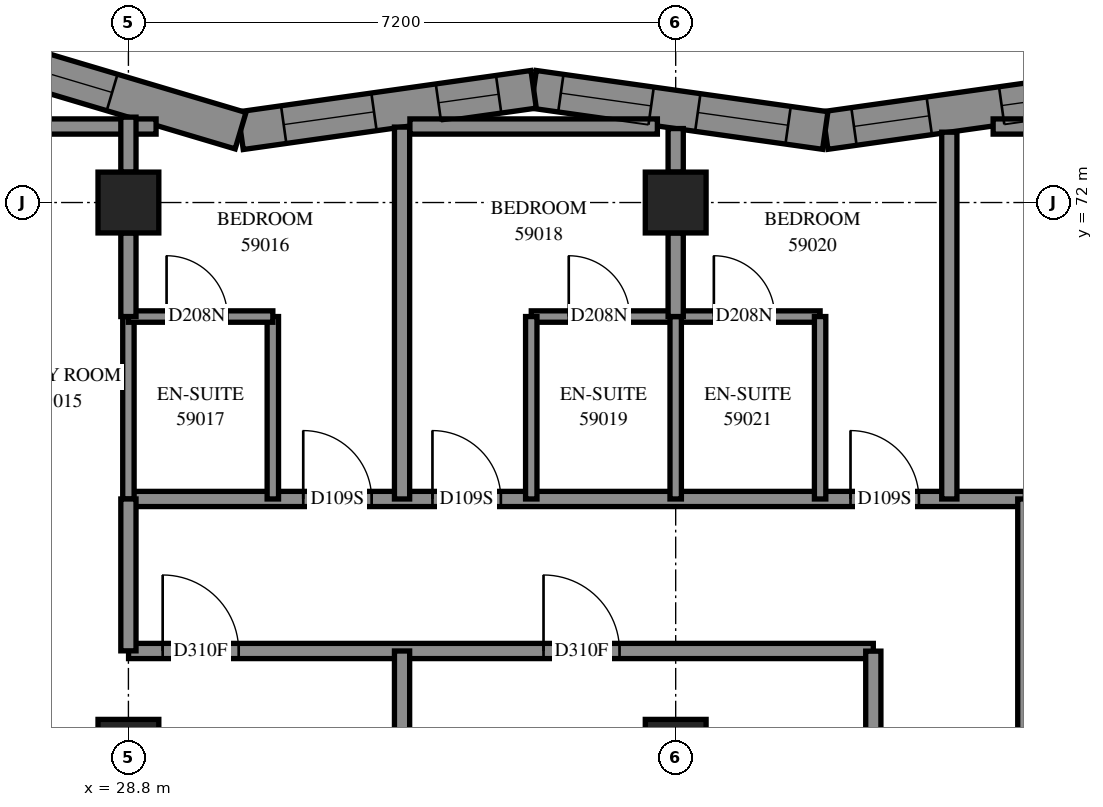
"""IFC4 building model, lengths in metres.
Left out: names, types, materials, properties, quantities, classifications, styles, units other than length and angle.
Written with IfcOpenShell. Run it as: python <this file> out.ifc"""

import sys

from ifc_helpers import new_model, si_unit, direction, frame, frame_2d, origin, origin_2d, place, context, subcontext, project, spatial, polyline, rectangle, outline, extrude, element, fill, save


model = new_model("IFC4")
c1 = context("Model", 3, precision=1e-05, world=origin(), true_north=direction((0.0, 1.0)))
c2 = subcontext(c1, "Body", "Model", "MODEL_VIEW")
j1 = project(units=[si_unit("LENGTHUNIT", "METRE"), si_unit("PLANEANGLEUNIT", "RADIAN")], contexts=[c1])
p1 = place(None, origin())
s1 = spatial("IfcSite", under=j1, at=p1, CompositionType="ELEMENT")
p2 = place(p1, origin())
s2 = spatial("IfcBuilding", under=s1, at=p2, CompositionType="ELEMENT")
p3 = place(p2, frame((0.0, 0.0, 216.8)))
s3 = spatial("IfcBuildingStorey", under=s2, at=p3, CompositionType="ELEMENT", Elevation=216.8)
for number, where, z_axis, x_axis in (
    (1, (28.8, 64.8, 0.0), (0.0, 0.0, 1.0), (1.0, 0.0, 0.0)),
    (2, (28.8, 72.0, 0.0), (0.0, 0.0, 1.0), (1.0, 0.0, 0.0)),
    (3, (36.0, 64.8, 0.0), (0.0, 0.0, 1.0), (1.0, 0.0, 0.0)),
    (4, (36.0, 72.0, 0.0), (0.0, 0.0, 1.0), (1.0, 0.0, 0.0)),
):
    element("IfcColumn", number, at=place(p3, frame(where, z_axis=z_axis, x_axis=x_axis)), inside=s3, PredefinedType="COLUMN", context=c2, shape_type="SweptSolid", body=[
        extrude(rectangle(XDim=0.8, YDim=0.8, at=origin_2d()), origin(), (0.0, 0.0, 1.0), 3.1),
    ])
p4 = place(p3, frame((41.804, 73.49, 0.0), z_axis=(0.0, 0.0, 1.0), x_axis=(-0.9901681853, -0.1398819675, 0.0)))
e5 = element("IfcWall", 5, at=p4, inside=s3, PredefinedType="SOLIDWALL", context=c2, shape_type="SweptSolid", body=[
    extrude(outline(polyline([(-0.035, -0.25), (3.839, -0.25), (3.91, 0.25), (0.035, 0.25), (-0.035, -0.25)])), origin(), (0.0, 0.0, 1.0), 3.1),
])
p5 = place(p4, frame((0.331, 0.0, 0.45)))
e6 = element("IfcOpeningElement", 6, at=p5, cuts=e5, PredefinedType="OPENING", context=c2, shape_type="SweptSolid", body=[
    extrude(rectangle(XDim=1.2, YDim=2.5, at=frame_2d((0.6, 1.25))), frame((0.0, 0.26, 0.0), z_axis=(0.0, -1.0, 0.0), x_axis=(1.0, 0.0, 0.0)), (0.0, 0.0, 1.0), 0.52),
])
p6 = place(p4, frame((2.493, 0.0, 0.45)))
e7 = element("IfcOpeningElement", 7, at=p6, cuts=e5, PredefinedType="OPENING", context=c2, shape_type="SweptSolid", body=[
    extrude(rectangle(XDim=1.0, YDim=2.5, at=frame_2d((0.5, 1.25))), frame((0.0, 0.26, 0.0), z_axis=(0.0, -1.0, 0.0), x_axis=(1.0, 0.0, 0.0)), (0.0, 0.0, 1.0), 0.52),
])
p7 = place(p3, frame((37.968, 72.948, 0.0), z_axis=(0.0, 0.0, 1.0), x_axis=(-0.9901676803, 0.1398855422, 0.0)))
e8 = element("IfcWall", 8, at=p7, inside=s3, PredefinedType="SOLIDWALL", context=c2, shape_type="SweptSolid", body=[
    extrude(outline(polyline([(0.035, -0.25), (3.91, -0.25), (3.839, 0.25), (-0.035, 0.25), (0.035, -0.25)])), origin(), (0.0, 0.0, 1.0), 3.1),
])
p8 = place(p7, frame((0.494, 0.0, 0.45)))
e9 = element("IfcOpeningElement", 9, at=p8, cuts=e8, PredefinedType="OPENING", context=c2, shape_type="SweptSolid", body=[
    extrude(rectangle(XDim=1.2, YDim=2.5, at=frame_2d((0.6, 1.25))), frame((0.0, 0.26, 0.0), z_axis=(0.0, -1.0, 0.0), x_axis=(1.0, 0.0, 0.0)), (0.0, 0.0, 1.0), 0.52),
])
p9 = place(p7, frame((2.313, 0.0, 0.45)))
e10 = element("IfcOpeningElement", 10, at=p9, cuts=e8, PredefinedType="OPENING", context=c2, shape_type="SweptSolid", body=[
    extrude(rectangle(XDim=1.2, YDim=2.5, at=frame_2d((0.6, 1.25))), frame((0.0, 0.26, 0.0), z_axis=(0.0, -1.0, 0.0), x_axis=(1.0, 0.0, 0.0)), (0.0, 0.0, 1.0), 0.52),
])
p10 = place(p3, frame((34.131, 73.49, 0.0), z_axis=(0.0, 0.0, 1.0), x_axis=(-0.9901681239, -0.1398824019, 0.0)))
e11 = element("IfcWall", 11, at=p10, inside=s3, PredefinedType="SOLIDWALL", context=c2, shape_type="SweptSolid", body=[
    extrude(outline(polyline([(-0.035, -0.25), (3.839, -0.25), (3.949, 0.25), (0.035, 0.25), (-0.035, -0.25)])), origin(), (0.0, 0.0, 1.0), 3.1),
])
p11 = place(p10, frame((2.121, 0.0, 0.45)))
e12 = element("IfcOpeningElement", 12, at=p11, cuts=e11, PredefinedType="OPENING", context=c2, shape_type="SweptSolid", body=[
    extrude(rectangle(XDim=1.2, YDim=2.5, at=frame_2d((0.6, 1.25))), frame((0.0, 0.26, 0.0), z_axis=(0.0, -1.0, 0.0), x_axis=(1.0, 0.0, 0.0)), (0.0, 0.0, 1.0), 0.52),
])
p12 = place(p10, frame((0.465, 0.0, 0.45)))
e13 = element("IfcOpeningElement", 13, at=p12, cuts=e11, PredefinedType="OPENING", context=c2, shape_type="SweptSolid", body=[
    extrude(rectangle(XDim=0.8, YDim=2.5, at=frame_2d((0.4, 1.25))), frame((0.0, 0.26, 0.0), z_axis=(0.0, -1.0, 0.0), x_axis=(1.0, 0.0, 0.0)), (0.0, 0.0, 1.0), 0.52),
])
p13 = place(p3, frame((30.276, 72.945, 0.0), z_axis=(0.0, 0.0, 1.0), x_axis=(-0.9584414972, 0.2852891453, 0.0)))
e14 = element("IfcWall", 14, at=p13, inside=s3, PredefinedType="SOLIDWALL", context=c2, shape_type="SweptSolid", body=[
    extrude(outline(polyline([(0.054, -0.25), (4.058, -0.25), (3.387, 0.25), (-0.054, 0.25), (0.054, -0.25)])), origin(), (0.0, 0.0, 1.0), 3.1),
])
p14 = place(p13, frame((1.763, 0.0, 0.45)))
e15 = element("IfcOpeningElement", 15, at=p14, cuts=e14, PredefinedType="OPENING", context=c2, shape_type="SweptSolid", body=[
    extrude(rectangle(XDim=1.2, YDim=2.5, at=frame_2d((0.6, 1.25))), frame((0.0, 0.26, 0.0), z_axis=(0.0, -1.0, 0.0), x_axis=(1.0, 0.0, 0.0)), (0.0, 0.0, 1.0), 0.52),
])
p15 = place(p3, frame((28.8, 68.1, 0.0), z_axis=(0.0, 0.0, 1.0), x_axis=(1.0, 0.0, 0.0)))
e16 = element("IfcWall", 16, at=p15, inside=s3, PredefinedType="PARTITIONING", context=c2, shape_type="SweptSolid", body=[
    extrude(rectangle(XDim=11.8, YDim=0.2, at=frame_2d((5.9, 0.0))), origin(), (0.0, 0.0, 1.0), 3.1),
])
p16 = place(p15, frame((2.3, 0.0, 0.0)))
e17 = element("IfcOpeningElement", 17, at=p16, cuts=e16, PredefinedType="OPENING", context=c2, shape_type="SweptSolid", body=[
    extrude(rectangle(XDim=0.9, YDim=2.1, at=frame_2d((0.45, 1.05))), frame((0.0, 0.11, 0.0), z_axis=(0.0, -1.0, 0.0), x_axis=(1.0, 0.0, 0.0)), (0.0, 0.0, 1.0), 0.22),
])
p17 = place(p15, frame((4.0, 0.0, 0.0)))
e18 = element("IfcOpeningElement", 18, at=p17, cuts=e16, PredefinedType="OPENING", context=c2, shape_type="SweptSolid", body=[
    extrude(rectangle(XDim=0.9, YDim=2.1, at=frame_2d((0.45, 1.05))), frame((0.0, 0.11, 0.0), z_axis=(0.0, -1.0, 0.0), x_axis=(1.0, 0.0, 0.0)), (0.0, 0.0, 1.0), 0.22),
])
p18 = place(p15, frame((9.5, 0.0, 0.0)))
e19 = element("IfcOpeningElement", 19, at=p18, cuts=e16, PredefinedType="OPENING", context=c2, shape_type="SweptSolid", body=[
    extrude(rectangle(XDim=0.9, YDim=2.1, at=frame_2d((0.45, 1.05))), frame((0.0, 0.11, 0.0), z_axis=(0.0, -1.0, 0.0), x_axis=(1.0, 0.0, 0.0)), (0.0, 0.0, 1.0), 0.22),
])
p19 = place(p3, frame((28.802, 66.1, 0.0), z_axis=(0.0, 0.0, 1.0), x_axis=(1.0, 0.0, 0.0)))
e20 = element("IfcWall", 20, at=p19, inside=s3, PredefinedType="PARTITIONING", context=c2, shape_type="SweptSolid", body=[
    extrude(rectangle(XDim=9.798, YDim=0.2, at=frame_2d((4.899, 0.0))), origin(), (0.0, 0.0, 1.0), 3.1),
])
p20 = place(p19, frame((0.449, 0.0, 0.0)))
e21 = element("IfcOpeningElement", 21, at=p20, cuts=e20, PredefinedType="OPENING", context=c2, shape_type="SweptSolid", body=[
    extrude(rectangle(XDim=1.0, YDim=2.1, at=frame_2d((0.5, 1.05))), frame((0.0, 0.11, 0.0), z_axis=(0.0, -1.0, 0.0), x_axis=(1.0, 0.0, 0.0)), (0.0, 0.0, 1.0), 0.22),
])
p21 = place(p19, frame((5.459, 0.0, 0.0)))
e22 = element("IfcOpeningElement", 22, at=p21, cuts=e20, PredefinedType="OPENING", context=c2, shape_type="SweptSolid", body=[
    extrude(rectangle(XDim=1.0, YDim=2.1, at=frame_2d((0.5, 1.05))), frame((0.0, 0.11, 0.0), z_axis=(0.0, -1.0, 0.0), x_axis=(1.0, 0.0, 0.0)), (0.0, 0.0, 1.0), 0.22),
])
p22 = place(p3, frame((32.4, 68.1, 0.0), z_axis=(0.0, 0.0, 1.0), x_axis=(0.0, 1.0, 0.0)))
e23 = element("IfcWall", 23, at=p22, inside=s3, PredefinedType="PARTITIONING", context=c2, shape_type="SweptSolid", body=[
    extrude(rectangle(XDim=4.893, YDim=0.2, at=frame_2d((2.446, 0.0))), origin(), (0.0, 0.0, 1.0), 3.1),
])
p23 = place(p3, frame((39.6, 68.1, 0.0), z_axis=(0.0, 0.0, 1.0), x_axis=(0.0, 1.0, 0.0)))
e24 = element("IfcWall", 24, at=p23, inside=s3, PredefinedType="PARTITIONING", context=c2, shape_type="SweptSolid", body=[
    extrude(rectangle(XDim=4.826, YDim=0.2, at=frame_2d((2.413, 0.0))), origin(), (0.0, 0.0, 1.0), 3.1),
])
p24 = place(p3, frame((40.6, 63.402, 0.0), z_axis=(0.0, 0.0, 1.0), x_axis=(0.0, 1.0, 0.0)))
e25 = element("IfcWall", 25, at=p24, inside=s3, PredefinedType="PARTITIONING", context=c2, shape_type="SweptSolid", body=[
    extrude(rectangle(XDim=4.698, YDim=0.2, at=frame_2d((2.349, 0.0))), origin(), (0.0, 0.0, 1.0), 3.1),
])
p25 = place(p3, frame((34.1, 70.5, 0.0), z_axis=(0.0, 0.0, 1.0), x_axis=(1.0, 0.0, 0.0)))
e26 = element("IfcWall", 26, at=p25, inside=s3, PredefinedType="PARTITIONING", context=c2, shape_type="SweptSolid", body=[
    extrude(rectangle(XDim=3.8, YDim=0.15, at=frame_2d((1.9, 0.0))), origin(), (0.0, 0.0, 1.0), 3.1),
])
p26 = place(p25, frame((0.493, 0.0, 0.0)))
e27 = element("IfcOpeningElement", 27, at=p26, cuts=e26, PredefinedType="OPENING", context=c2, shape_type="SweptSolid", body=[
    extrude(rectangle(XDim=0.8, YDim=2.1, at=frame_2d((0.4, 1.05))), frame((0.0, 0.085, 0.0), z_axis=(0.0, -1.0, 0.0), x_axis=(1.0, 0.0, 0.0)), (0.0, 0.0, 1.0), 0.17),
])
p27 = place(p25, frame((2.402, 0.0, 0.0)))
e28 = element("IfcOpeningElement", 28, at=p27, cuts=e26, PredefinedType="OPENING", context=c2, shape_type="SweptSolid", body=[
    extrude(rectangle(XDim=0.8, YDim=2.1, at=frame_2d((0.4, 1.05))), frame((0.0, 0.085, 0.0), z_axis=(0.0, -1.0, 0.0), x_axis=(1.0, 0.0, 0.0)), (0.0, 0.0, 1.0), 0.17),
])
for number, where, z_axis, x_axis in (
    (29, (32.503, 73.0, 0.0), (0.0, 0.0, 1.0), (1.0, 0.0, 0.0)),
    (30, (40.176, 73.0, 0.0), (0.0, 0.0, 1.0), (1.0, 0.0, 0.0)),
):
    element("IfcWall", number, at=place(p3, frame(where, z_axis=z_axis, x_axis=x_axis)), inside=s3, PredefinedType="PARTITIONING", context=c2, shape_type="SweptSolid", body=[
        extrude(rectangle(XDim=3.256, YDim=0.2, at=frame_2d((1.628, 0.0))), origin(), (0.0, 0.0, 1.0), 3.1),
    ])
p28 = place(p3, frame((38.6, 63.402, 0.0), z_axis=(0.0, 0.0, 1.0), x_axis=(0.0, 1.0, 0.0)))
e31 = element("IfcWall", 31, at=p28, inside=s3, PredefinedType="PARTITIONING", context=c2, shape_type="SweptSolid", body=[
    extrude(rectangle(XDim=2.696, YDim=0.2, at=frame_2d((1.348, 0.0))), origin(), (0.0, 0.0, 1.0), 3.1),
])
p29 = place(p3, frame((28.8, 68.1, 0.0), z_axis=(0.0, 0.0, 1.0), x_axis=(0.0, 1.0, 0.0)))
e32 = element("IfcWall", 32, at=p29, inside=s3, PredefinedType="PARTITIONING", context=c2, shape_type="SweptSolid", body=[
    extrude(rectangle(XDim=2.4, YDim=0.15, at=frame_2d((1.2, 0.0))), origin(), (0.0, 0.0, 1.0), 2.6),
])
for number, where, z_axis, x_axis in (
    (33, (30.7, 68.1, 0.0), (0.0, 0.0, 1.0), (0.0, 1.0, 0.0)),
    (34, (34.1, 68.1, 0.0), (0.0, 0.0, 1.0), (0.0, 1.0, 0.0)),
    (35, (37.9, 68.1, 0.0), (0.0, 0.0, 1.0), (0.0, 1.0, 0.0)),
    (36, (36.0, 68.1, 0.0), (0.0, 0.0, 1.0), (0.0, 1.0, 0.0)),
):
    element("IfcWall", number, at=place(p3, frame(where, z_axis=z_axis, x_axis=x_axis)), inside=s3, PredefinedType="PARTITIONING", context=c2, shape_type="SweptSolid", body=[
        extrude(rectangle(XDim=2.4, YDim=0.15, at=frame_2d((1.2, 0.0))), origin(), (0.0, 0.0, 1.0), 3.1),
    ])
p30 = place(p3, frame((26.958, 73.0, 0.0), z_axis=(0.0, 0.0, 1.0), x_axis=(1.0, 0.0, 0.0)))
e37 = element("IfcWall", 37, at=p30, inside=s3, PredefinedType="PARTITIONING", context=c2, shape_type="SweptSolid", body=[
    extrude(rectangle(XDim=2.206, YDim=0.2, at=frame_2d((1.103, 0.0))), origin(), (0.0, 0.0, 1.0), 3.1),
])
p31 = place(p3, frame((28.8, 66.102, 0.0), z_axis=(0.0, 0.0, 1.0), x_axis=(0.0, 1.0, 0.0)))
e38 = element("IfcWall", 38, at=p31, inside=s3, PredefinedType="PARTITIONING", context=c2, shape_type="SweptSolid", body=[
    extrude(rectangle(XDim=1.998, YDim=0.2, at=frame_2d((0.999, 0.0))), origin(), (0.0, 0.0, 1.0), 2.6),
])
p32 = place(p3, frame((32.4, 64.1, 0.0), z_axis=(0.0, 0.0, 1.0), x_axis=(0.0, 1.0, 0.0)))
e39 = element("IfcWall", 39, at=p32, inside=s3, PredefinedType="PARTITIONING", context=c2, shape_type="SweptSolid", body=[
    extrude(rectangle(XDim=2.0, YDim=0.2, at=frame_2d((1.0, 0.0))), origin(), (0.0, 0.0, 1.0), 3.1),
])
p33 = place(p3, frame((28.8, 70.5, 0.0), z_axis=(0.0, 0.0, 1.0), x_axis=(1.0, 0.0, 0.0)))
e40 = element("IfcWall", 40, at=p33, inside=s3, PredefinedType="PARTITIONING", context=c2, shape_type="SweptSolid", body=[
    extrude(rectangle(XDim=1.9, YDim=0.15, at=frame_2d((0.95, 0.0))), origin(), (0.0, 0.0, 1.0), 3.1),
])
p34 = place(p33, frame((0.502, 0.0, 0.0)))
e41 = element("IfcOpeningElement", 41, at=p34, cuts=e40, PredefinedType="OPENING", context=c2, shape_type="SweptSolid", body=[
    extrude(rectangle(XDim=0.8, YDim=2.1, at=frame_2d((0.4, 1.05))), frame((0.0, 0.085, 0.0), z_axis=(0.0, -1.0, 0.0), x_axis=(1.0, 0.0, 0.0)), (0.0, 0.0, 1.0), 0.17),
])
p35 = place(p3, frame((28.8, 70.5, 0.0), z_axis=(0.0, 0.0, 1.0), x_axis=(0.0, 1.0, 0.0)))
e42 = element("IfcWall", 42, at=p35, inside=s3, PredefinedType="PARTITIONING", context=c2, shape_type="SweptSolid", body=[
    extrude(rectangle(XDim=1.1, YDim=0.2, at=frame_2d((0.55, 0.0))), origin(), (0.0, 0.0, 1.0), 2.6),
])
p36 = place(p3, frame((36.0, 70.5, 0.0), z_axis=(0.0, 0.0, 1.0), x_axis=(0.0, 1.0, 0.0)))
e43 = element("IfcWall", 43, at=p36, inside=s3, PredefinedType="PARTITIONING", context=c2, shape_type="SweptSolid", body=[
    extrude(rectangle(XDim=1.1, YDim=0.2, at=frame_2d((0.55, 0.0))), origin(), (0.0, 0.0, 1.0), 3.1),
])
p37 = place(p3, frame((28.8, 72.4, 0.0), z_axis=(0.0, 0.0, 1.0), x_axis=(0.0, 1.0, 0.0)))
e44 = element("IfcWall", 44, at=p37, inside=s3, PredefinedType="PARTITIONING", context=c2, shape_type="SweptSolid", body=[
    extrude(rectangle(XDim=0.723, YDim=0.2, at=frame_2d((0.362, 0.0))), origin(), (0.0, 0.0, 1.0), 3.1),
])
p38 = place(p3, frame((36.0, 72.4, 0.0), z_axis=(0.0, 0.0, 1.0), x_axis=(0.0, 1.0, 0.0)))
e45 = element("IfcWall", 45, at=p38, inside=s3, PredefinedType="PARTITIONING", context=c2, shape_type="SweptSolid", body=[
    extrude(rectangle(XDim=0.573, YDim=0.2, at=frame_2d((0.286, 0.0))), origin(), (0.0, 0.0, 1.0), 3.1),
])
p39 = place(p5, origin())
e46 = element("IfcWindow", 46, at=p39, inside=s3, PartitioningType="SINGLE_PANEL", PredefinedType="WINDOW", context=c2, shape_type="SweptSolid", body=[
    extrude(rectangle(XDim=1.2, YDim=2.5, at=frame_2d((0.6, 1.25))), frame((0.0, 0.14, 0.0), z_axis=(0.0, -1.0, 0.0), x_axis=(1.0, 0.0, 0.0)), (0.0, 0.0, 1.0), 0.06),
])
fill(e6, e46)
p40 = place(p8, origin())
e47 = element("IfcWindow", 47, at=p40, inside=s3, PartitioningType="SINGLE_PANEL", PredefinedType="WINDOW", context=c2, shape_type="SweptSolid", body=[
    extrude(rectangle(XDim=1.2, YDim=2.5, at=frame_2d((0.6, 1.25))), frame((0.0, 0.18, 0.0), z_axis=(0.0, -1.0, 0.0), x_axis=(1.0, 0.0, 0.0)), (0.0, 0.0, 1.0), 0.06),
])
fill(e9, e47)
p41 = place(p9, origin())
e48 = element("IfcWindow", 48, at=p41, inside=s3, PartitioningType="SINGLE_PANEL", PredefinedType="WINDOW", context=c2, shape_type="SweptSolid", body=[
    extrude(rectangle(XDim=1.2, YDim=2.5, at=frame_2d((0.6, 1.25))), frame((0.0, 0.14, 0.0), z_axis=(0.0, -1.0, 0.0), x_axis=(1.0, 0.0, 0.0)), (0.0, 0.0, 1.0), 0.06),
])
fill(e10, e48)
p42 = place(p11, origin())
e49 = element("IfcWindow", 49, at=p42, inside=s3, PartitioningType="SINGLE_PANEL", PredefinedType="WINDOW", context=c2, shape_type="SweptSolid", body=[
    extrude(rectangle(XDim=1.2, YDim=2.5, at=frame_2d((0.6, 1.25))), frame((0.0, 0.18, 0.0), z_axis=(0.0, -1.0, 0.0), x_axis=(1.0, 0.0, 0.0)), (0.0, 0.0, 1.0), 0.06),
])
fill(e12, e49)
p43 = place(p14, origin())
e50 = element("IfcWindow", 50, at=p43, inside=s3, PartitioningType="SINGLE_PANEL", PredefinedType="WINDOW", context=c2, shape_type="SweptSolid", body=[
    extrude(rectangle(XDim=1.2, YDim=2.5, at=frame_2d((0.6, 1.25))), frame((0.0, 0.18, 0.0), z_axis=(0.0, -1.0, 0.0), x_axis=(1.0, 0.0, 0.0)), (0.0, 0.0, 1.0), 0.06),
])
fill(e15, e50)
p44 = place(p20, origin())
e51 = element("IfcDoor", 51, at=p44, inside=s3, OperationType="SINGLE_SWING_LEFT", PredefinedType="DOOR", context=c2, shape_type="SweptSolid", body=[
    extrude(rectangle(XDim=1.0, YDim=2.1, at=frame_2d((0.5, 1.05))), frame((0.0, 0.025, 0.0), z_axis=(0.0, -1.0, 0.0), x_axis=(1.0, 0.0, 0.0)), (0.0, 0.0, 1.0), 0.05),
])
fill(e21, e51)
p45 = place(p16, origin())
e52 = element("IfcDoor", 52, at=p45, inside=s3, OperationType="SINGLE_SWING_RIGHT", PredefinedType="DOOR", context=c2, shape_type="SweptSolid", body=[
    extrude(rectangle(XDim=0.9, YDim=2.1, at=frame_2d((0.45, 1.05))), frame((0.0, 0.025, 0.0), z_axis=(0.0, -1.0, 0.0), x_axis=(1.0, 0.0, 0.0)), (0.0, 0.0, 1.0), 0.05),
])
fill(e17, e52)
p46 = place(p34, origin())
e53 = element("IfcDoor", 53, at=p46, inside=s3, OperationType="SINGLE_SWING_RIGHT", PredefinedType="DOOR", context=c2, shape_type="SweptSolid", body=[
    extrude(rectangle(XDim=0.8, YDim=2.1, at=frame_2d((0.4, 1.05))), frame((0.0, 0.025, 0.0), z_axis=(0.0, -1.0, 0.0), x_axis=(1.0, 0.0, 0.0)), (0.0, 0.0, 1.0), 0.05),
])
fill(e41, e53)
p47 = place(p17, origin())
e54 = element("IfcDoor", 54, at=p47, inside=s3, OperationType="SINGLE_SWING_LEFT", PredefinedType="DOOR", context=c2, shape_type="SweptSolid", body=[
    extrude(rectangle(XDim=0.9, YDim=2.1, at=frame_2d((0.45, 1.05))), frame((0.0, 0.025, 0.0), z_axis=(0.0, -1.0, 0.0), x_axis=(1.0, 0.0, 0.0)), (0.0, 0.0, 1.0), 0.05),
])
fill(e18, e54)
p48 = place(p26, origin())
e55 = element("IfcDoor", 55, at=p48, inside=s3, OperationType="SINGLE_SWING_RIGHT", PredefinedType="DOOR", context=c2, shape_type="SweptSolid", body=[
    extrude(rectangle(XDim=0.8, YDim=2.1, at=frame_2d((0.4, 1.05))), frame((0.0, 0.025, 0.0), z_axis=(0.0, -1.0, 0.0), x_axis=(1.0, 0.0, 0.0)), (0.0, 0.0, 1.0), 0.05),
])
fill(e27, e55)
p49 = place(p18, origin())
e56 = element("IfcDoor", 56, at=p49, inside=s3, OperationType="SINGLE_SWING_RIGHT", PredefinedType="DOOR", context=c2, shape_type="SweptSolid", body=[
    extrude(rectangle(XDim=0.9, YDim=2.1, at=frame_2d((0.45, 1.05))), frame((0.0, 0.025, 0.0), z_axis=(0.0, -1.0, 0.0), x_axis=(1.0, 0.0, 0.0)), (0.0, 0.0, 1.0), 0.05),
])
fill(e19, e56)
p50 = place(p27, origin())
e57 = element("IfcDoor", 57, at=p50, inside=s3, OperationType="SINGLE_SWING_RIGHT", PredefinedType="DOOR", context=c2, shape_type="SweptSolid", body=[
    extrude(rectangle(XDim=0.8, YDim=2.1, at=frame_2d((0.4, 1.05))), frame((0.0, 0.025, 0.0), z_axis=(0.0, -1.0, 0.0), x_axis=(1.0, 0.0, 0.0)), (0.0, 0.0, 1.0), 0.05),
])
fill(e28, e57)
p51 = place(p21, origin())
e58 = element("IfcDoor", 58, at=p51, inside=s3, OperationType="SINGLE_SWING_RIGHT", PredefinedType="DOOR", context=c2, shape_type="SweptSolid", body=[
    extrude(rectangle(XDim=1.0, YDim=2.1, at=frame_2d((0.5, 1.05))), frame((0.0, 0.025, 0.0), z_axis=(0.0, -1.0, 0.0), x_axis=(1.0, 0.0, 0.0)), (0.0, 0.0, 1.0), 0.05),
])
fill(e22, e58)
p52 = place(p6, origin())
e59 = element("IfcWindow", 59, at=p52, inside=s3, PartitioningType="SINGLE_PANEL", PredefinedType="WINDOW", context=c2, shape_type="SweptSolid", body=[
    extrude(rectangle(XDim=1.0, YDim=2.5, at=frame_2d((0.5, 1.25))), frame((0.0, 0.18, 0.0), z_axis=(0.0, -1.0, 0.0), x_axis=(1.0, 0.0, 0.0)), (0.0, 0.0, 1.0), 0.06),
])
fill(e7, e59)
p53 = place(p12, origin())
e60 = element("IfcWindow", 60, at=p53, inside=s3, PartitioningType="SINGLE_PANEL", PredefinedType="WINDOW", context=c2, shape_type="SweptSolid", body=[
    extrude(rectangle(XDim=0.8, YDim=2.5, at=frame_2d((0.4, 1.25))), frame((0.0, 0.18, 0.0), z_axis=(0.0, -1.0, 0.0), x_axis=(1.0, 0.0, 0.0)), (0.0, 0.0, 1.0), 0.06),
])
fill(e13, e60)
save(model, sys.argv[1])
